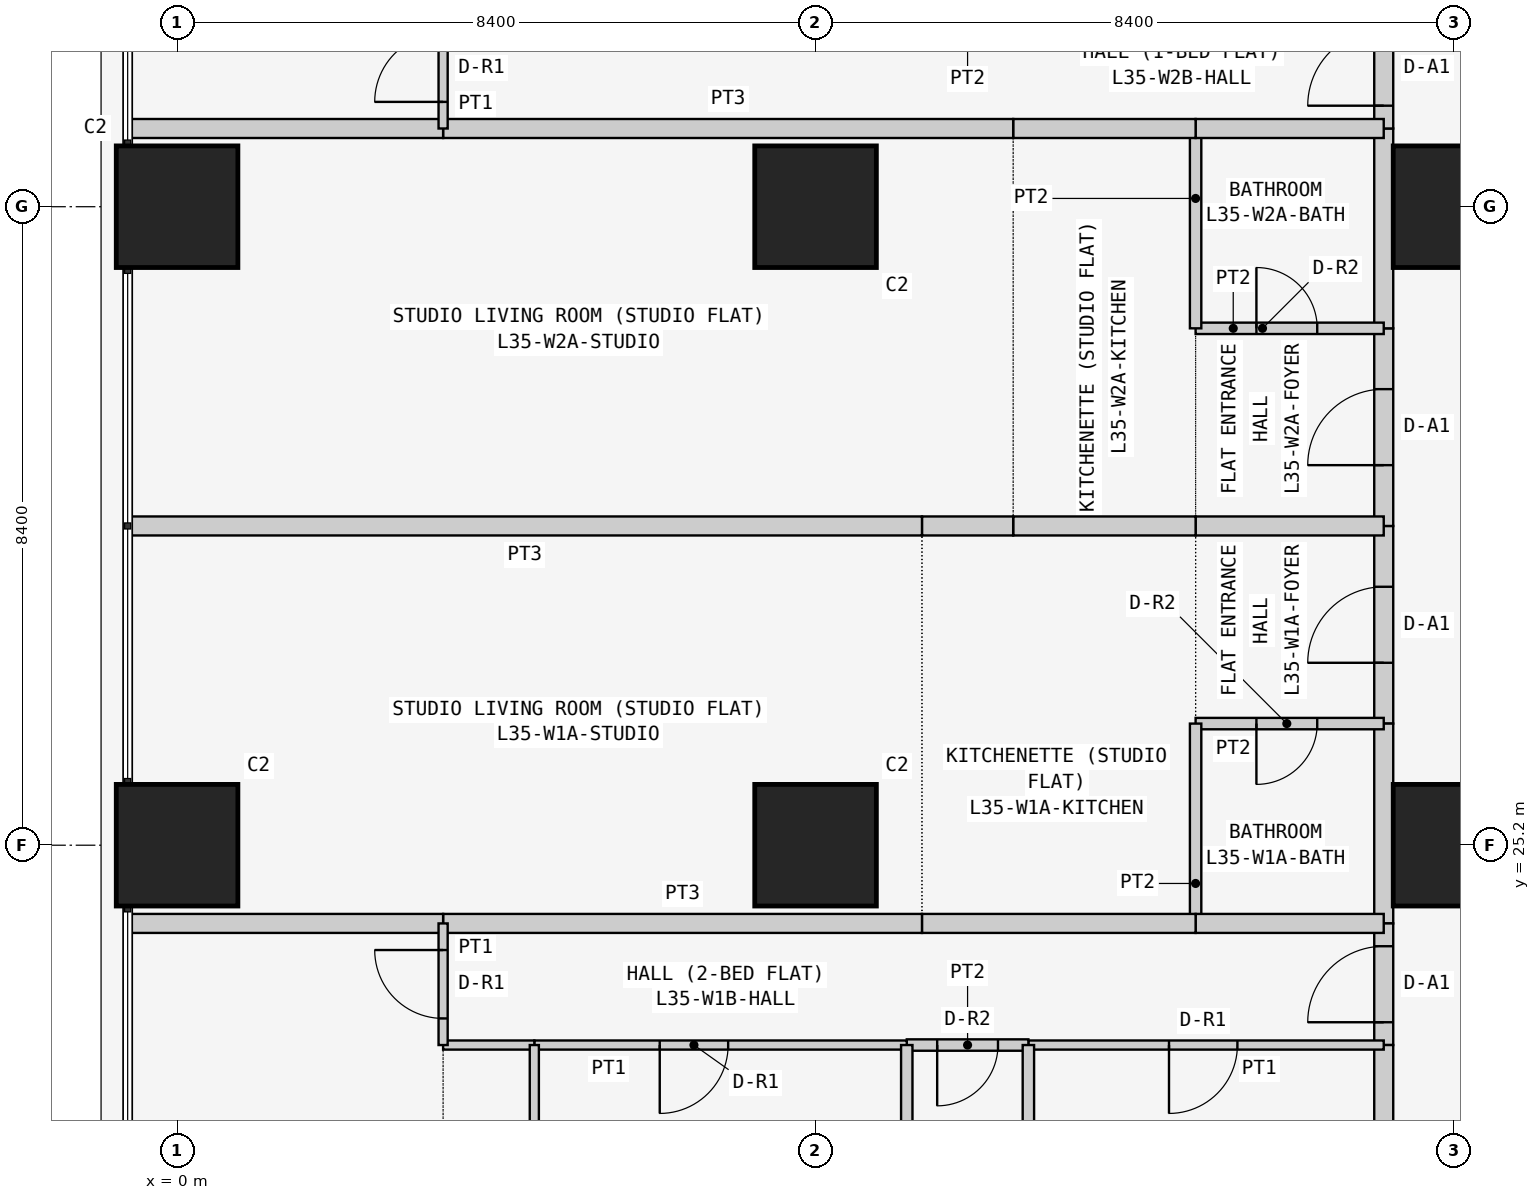
"""IFC4 building model, lengths in metres.
Left out: names, types, materials, properties, quantities, classifications, styles, units other than length and angle.
Written with IfcOpenShell. Run it as: python <this file> out.ifc"""

import sys

from ifc_helpers import new_model, si_unit, direction, frame, frame_2d, origin, origin_2d, place, context, subcontext, project, spatial, rectangle, extrude, element, fill, save


model = new_model("IFC4")
c1 = context("Model", 3, precision=1e-05, world=origin(), true_north=direction((0.0, 1.0)))
c2 = subcontext(c1, "Body", "Model", "MODEL_VIEW")
j1 = project(units=[si_unit("LENGTHUNIT", "METRE"), si_unit("PLANEANGLEUNIT", "RADIAN")], contexts=[c1])
p1 = place(None, origin())
s1 = spatial("IfcSite", under=j1, at=p1, CompositionType="ELEMENT")
p2 = place(p1, origin())
s2 = spatial("IfcBuilding", under=s1, at=p2, CompositionType="ELEMENT")
p3 = place(p2, frame((0.0, 0.0, 137.7)))
s3 = spatial("IfcBuildingStorey", under=s2, at=p3, CompositionType="ELEMENT", Elevation=137.7)
for number, where, z_axis, x_axis in (
    (1, (0.0, 25.2, 0.0), (0.0, 0.0, 1.0), (1.0, 0.0, 0.0)),
    (2, (0.0, 33.6, 0.0), (0.0, 0.0, 1.0), (1.0, 0.0, 0.0)),
    (3, (8.4, 25.2, 0.0), (0.0, 0.0, 1.0), (1.0, 0.0, 0.0)),
    (4, (8.4, 33.6, 0.0), (0.0, 0.0, 1.0), (1.0, 0.0, 0.0)),
    (5, (16.8, 25.2, 0.0), (0.0, 0.0, 1.0), (1.0, 0.0, 0.0)),
    (6, (16.8, 33.6, 0.0), (0.0, 0.0, 1.0), (1.0, 0.0, 0.0)),
):
    element("IfcColumn", number, at=place(p3, frame(where, z_axis=z_axis, x_axis=x_axis)), inside=s3, PredefinedType="COLUMN", context=c2, shape_type="SweptSolid", body=[
        extrude(rectangle(XDim=1.6, YDim=1.6, at=origin_2d()), origin(), (0.0, 0.0, 1.0), 3.6),
    ])
p4 = place(p3, frame((15.875, 26.8, 0.0), z_axis=(0.0, 0.0, 1.0), x_axis=(0.0, 1.0, 0.0)))
e7 = element("IfcWall", 7, at=p4, inside=s3, PredefinedType="PARTITIONING", context=c2, shape_type="SweptSolid", body=[
    extrude(rectangle(XDim=2.6, YDim=0.25, at=frame_2d((1.3, 0.0))), origin(), (0.0, 0.0, 1.0), 3.45),
])
p5 = place(p4, frame((0.8, 0.0, 0.0)))
e8 = element("IfcOpeningElement", 8, at=p5, cuts=e7, PredefinedType="OPENING", context=c2, shape_type="SweptSolid", body=[
    extrude(rectangle(XDim=1.0, YDim=2.1, at=frame_2d((0.5, 1.05))), frame((0.0, 0.135, 0.0), z_axis=(0.0, -1.0, 0.0), x_axis=(1.0, 0.0, 0.0)), (0.0, 0.0, 1.0), 0.27),
])
p6 = place(p3, frame((15.875, 24.171, 0.0), z_axis=(0.0, 0.0, 1.0), x_axis=(0.0, 1.0, 0.0)))
e9 = element("IfcWall", 9, at=p6, inside=s3, PredefinedType="PARTITIONING", context=c2, shape_type="SweptSolid", body=[
    extrude(rectangle(XDim=2.629, YDim=0.25, at=frame_2d((1.314, 0.0))), origin(), (0.0, 0.0, 1.0), 3.45),
])
p7 = place(p3, frame((15.875, 22.571, 0.0), z_axis=(0.0, 0.0, 1.0), x_axis=(0.0, 1.0, 0.0)))
e10 = element("IfcWall", 10, at=p7, inside=s3, PredefinedType="PARTITIONING", context=c2, shape_type="SweptSolid", body=[
    extrude(rectangle(XDim=1.6, YDim=0.25, at=frame_2d((0.8, 0.0))), origin(), (0.0, 0.0, 1.0), 3.45),
])
p8 = place(p7, frame((0.3, 0.0, 0.0)))
e11 = element("IfcOpeningElement", 11, at=p8, cuts=e10, PredefinedType="OPENING", context=c2, shape_type="SweptSolid", body=[
    extrude(rectangle(XDim=1.0, YDim=2.1, at=frame_2d((0.5, 1.05))), frame((0.0, 0.135, 0.0), z_axis=(0.0, -1.0, 0.0), x_axis=(1.0, 0.0, 0.0)), (0.0, 0.0, 1.0), 0.27),
])
p9 = place(p3, frame((15.875, 16.1, 0.0), z_axis=(0.0, 0.0, 1.0), x_axis=(0.0, 1.0, 0.0)))
e12 = element("IfcWall", 12, at=p9, inside=s3, PredefinedType="PARTITIONING", context=c2, shape_type="SweptSolid", body=[
    extrude(rectangle(XDim=6.471, YDim=0.25, at=frame_2d((3.235, 0.0))), origin(), (0.0, 0.0, 1.0), 3.45),
])
p10 = place(p3, frame((15.875, 29.4, 0.0), z_axis=(0.0, 0.0, 1.0), x_axis=(0.0, 1.0, 0.0)))
e13 = element("IfcWall", 13, at=p10, inside=s3, PredefinedType="PARTITIONING", context=c2, shape_type="SweptSolid", body=[
    extrude(rectangle(XDim=2.6, YDim=0.25, at=frame_2d((1.3, 0.0))), origin(), (0.0, 0.0, 1.0), 3.45),
])
p11 = place(p10, frame((0.8, 0.0, 0.0)))
e14 = element("IfcOpeningElement", 14, at=p11, cuts=e13, PredefinedType="OPENING", context=c2, shape_type="SweptSolid", body=[
    extrude(rectangle(XDim=1.0, YDim=2.1, at=frame_2d((0.5, 1.05))), frame((0.0, 0.135, 0.0), z_axis=(0.0, -1.0, 0.0), x_axis=(1.0, 0.0, 0.0)), (0.0, 0.0, 1.0), 0.27),
])
p12 = place(p3, frame((15.875, 32.0, 0.0), z_axis=(0.0, 0.0, 1.0), x_axis=(0.0, 1.0, 0.0)))
e15 = element("IfcWall", 15, at=p12, inside=s3, PredefinedType="PARTITIONING", context=c2, shape_type="SweptSolid", body=[
    extrude(rectangle(XDim=2.629, YDim=0.25, at=frame_2d((1.314, 0.0))), origin(), (0.0, 0.0, 1.0), 3.45),
])
p13 = place(p3, frame((15.875, 34.629, 0.0), z_axis=(0.0, 0.0, 1.0), x_axis=(0.0, 1.0, 0.0)))
e16 = element("IfcWall", 16, at=p13, inside=s3, PredefinedType="PARTITIONING", context=c2, shape_type="SweptSolid", body=[
    extrude(rectangle(XDim=1.6, YDim=0.25, at=frame_2d((0.8, 0.0))), origin(), (0.0, 0.0, 1.0), 3.45),
])
p14 = place(p13, frame((0.3, 0.0, 0.0)))
e17 = element("IfcOpeningElement", 17, at=p14, cuts=e16, PredefinedType="OPENING", context=c2, shape_type="SweptSolid", body=[
    extrude(rectangle(XDim=1.0, YDim=2.1, at=frame_2d((0.5, 1.05))), frame((0.0, 0.135, 0.0), z_axis=(0.0, -1.0, 0.0), x_axis=(1.0, 0.0, 0.0)), (0.0, 0.0, 1.0), 0.27),
])
p15 = place(p3, frame((13.4, 26.8, 0.0), z_axis=(0.0, 0.0, 1.0), x_axis=(1.0, 0.0, 0.0)))
e18 = element("IfcWall", 18, at=p15, inside=s3, PredefinedType="PARTITIONING", context=c2, shape_type="SweptSolid", body=[
    extrude(rectangle(XDim=2.475, YDim=0.15, at=frame_2d((1.238, 0.0))), origin(), (0.0, 0.0, 1.0), 3.45),
])
p16 = place(p15, frame((0.8, 0.0, 0.0)))
e19 = element("IfcOpeningElement", 19, at=p16, cuts=e18, PredefinedType="OPENING", context=c2, shape_type="SweptSolid", body=[
    extrude(rectangle(XDim=0.8, YDim=2.1, at=frame_2d((0.4, 1.05))), frame((0.0, 0.085, 0.0), z_axis=(0.0, -1.0, 0.0), x_axis=(1.0, 0.0, 0.0)), (0.0, 0.0, 1.0), 0.17),
])
p17 = place(p3, frame((15.875, 29.4, 0.0), z_axis=(0.0, 0.0, 1.0), x_axis=(-1.0, 0.0, 0.0)))
e20 = element("IfcWall", 20, at=p17, inside=s3, PredefinedType="PARTITIONING", context=c2, shape_type="SweptSolid", body=[
    extrude(rectangle(XDim=2.475, YDim=0.25, at=frame_2d((1.238, 0.0))), origin(), (0.0, 0.0, 1.0), 3.45),
])
p18 = place(p3, frame((13.4, 26.8, 0.0), z_axis=(0.0, 0.0, 1.0), x_axis=(0.0, -1.0, 0.0)))
e21 = element("IfcWall", 21, at=p18, inside=s3, PredefinedType="PARTITIONING", context=c2, shape_type="SweptSolid", body=[
    extrude(rectangle(XDim=2.629, YDim=0.15, at=frame_2d((1.314, 0.0))), origin(), (0.0, 0.0, 1.0), 3.45),
])
p19 = place(p3, frame((13.4, 24.171, 0.0), z_axis=(0.0, 0.0, 1.0), x_axis=(1.0, 0.0, 0.0)))
e22 = element("IfcWall", 22, at=p19, inside=s3, PredefinedType="PARTITIONING", context=c2, shape_type="SweptSolid", body=[
    extrude(rectangle(XDim=2.475, YDim=0.25, at=frame_2d((1.238, 0.0))), origin(), (0.0, 0.0, 1.0), 3.45),
])
p20 = place(p3, frame((9.8, 24.171, 0.0), z_axis=(0.0, 0.0, 1.0), x_axis=(1.0, 0.0, 0.0)))
e23 = element("IfcWall", 23, at=p20, inside=s3, PredefinedType="PARTITIONING", context=c2, shape_type="SweptSolid", body=[
    extrude(rectangle(XDim=3.6, YDim=0.25, at=frame_2d((1.8, 0.0))), origin(), (0.0, 0.0, 1.0), 3.45),
])
p21 = place(p3, frame((13.4, 29.4, 0.0), z_axis=(0.0, 0.0, 1.0), x_axis=(-1.0, 0.0, 0.0)))
e24 = element("IfcWall", 24, at=p21, inside=s3, PredefinedType="PARTITIONING", context=c2, shape_type="SweptSolid", body=[
    extrude(rectangle(XDim=2.4, YDim=0.25, at=frame_2d((1.2, 0.0))), origin(), (0.0, 0.0, 1.0), 3.45),
])
p22 = place(p3, frame((11.0, 29.4, 0.0), z_axis=(0.0, 0.0, 1.0), x_axis=(-1.0, 0.0, 0.0)))
e25 = element("IfcWall", 25, at=p22, inside=s3, PredefinedType="PARTITIONING", context=c2, shape_type="SweptSolid", body=[
    extrude(rectangle(XDim=1.2, YDim=0.25, at=frame_2d((0.6, 0.0))), origin(), (0.0, 0.0, 1.0), 3.45),
])
p23 = place(p3, frame((3.5, 24.171, 0.0), z_axis=(0.0, 0.0, 1.0), x_axis=(1.0, 0.0, 0.0)))
e26 = element("IfcWall", 26, at=p23, inside=s3, PredefinedType="PARTITIONING", context=c2, shape_type="SweptSolid", body=[
    extrude(rectangle(XDim=6.3, YDim=0.25, at=frame_2d((3.15, 0.0))), origin(), (0.0, 0.0, 1.0), 3.45),
])
p24 = place(p3, frame((-0.65, 24.171, 0.0), z_axis=(0.0, 0.0, 1.0), x_axis=(1.0, 0.0, 0.0)))
e27 = element("IfcWall", 27, at=p24, inside=s3, PredefinedType="PARTITIONING", context=c2, shape_type="SweptSolid", body=[
    extrude(rectangle(XDim=4.15, YDim=0.25, at=frame_2d((2.075, 0.0))), origin(), (0.0, 0.0, 1.0), 3.45),
])
p25 = place(p3, frame((9.8, 29.4, 0.0), z_axis=(0.0, 0.0, 1.0), x_axis=(-1.0, 0.0, 0.0)))
e28 = element("IfcWall", 28, at=p25, inside=s3, PredefinedType="PARTITIONING", context=c2, shape_type="SweptSolid", body=[
    extrude(rectangle(XDim=10.45, YDim=0.25, at=frame_2d((5.225, 0.0))), origin(), (0.0, 0.0, 1.0), 3.45),
])
p26 = place(p3, frame((11.2, 22.571, 0.0), z_axis=(0.0, 0.0, 1.0), x_axis=(1.0, 0.0, 0.0)))
e29 = element("IfcWall", 29, at=p26, inside=s3, PredefinedType="PARTITIONING", context=c2, shape_type="SweptSolid", body=[
    extrude(rectangle(XDim=4.675, YDim=0.12, at=frame_2d((2.337, 0.0))), origin(), (0.0, 0.0, 1.0), 3.45),
])
p27 = place(p26, frame((1.85, 0.0, 0.0)))
e30 = element("IfcOpeningElement", 30, at=p27, cuts=e29, PredefinedType="OPENING", context=c2, shape_type="SweptSolid", body=[
    extrude(rectangle(XDim=0.9, YDim=2.1, at=frame_2d((0.45, 1.05))), frame((0.0, 0.07, 0.0), z_axis=(0.0, -1.0, 0.0), x_axis=(1.0, 0.0, 0.0)), (0.0, 0.0, 1.0), 0.14),
])
p28 = place(p3, frame((9.6, 22.571, 0.0), z_axis=(0.0, 0.0, 1.0), x_axis=(1.0, 0.0, 0.0)))
e31 = element("IfcWall", 31, at=p28, inside=s3, PredefinedType="PARTITIONING", context=c2, shape_type="SweptSolid", body=[
    extrude(rectangle(XDim=1.6, YDim=0.15, at=frame_2d((0.8, 0.0))), origin(), (0.0, 0.0, 1.0), 3.45),
])
p29 = place(p28, frame((0.4, 0.0, 0.0)))
e32 = element("IfcOpeningElement", 32, at=p29, cuts=e31, PredefinedType="OPENING", context=c2, shape_type="SweptSolid", body=[
    extrude(rectangle(XDim=0.8, YDim=2.1, at=frame_2d((0.4, 1.05))), frame((0.0, 0.085, 0.0), z_axis=(0.0, -1.0, 0.0), x_axis=(1.0, 0.0, 0.0)), (0.0, 0.0, 1.0), 0.17),
])
p30 = place(p3, frame((4.7, 22.571, 0.0), z_axis=(0.0, 0.0, 1.0), x_axis=(1.0, 0.0, 0.0)))
e33 = element("IfcWall", 33, at=p30, inside=s3, PredefinedType="PARTITIONING", context=c2, shape_type="SweptSolid", body=[
    extrude(rectangle(XDim=4.9, YDim=0.12, at=frame_2d((2.45, 0.0))), origin(), (0.0, 0.0, 1.0), 3.45),
])
p31 = place(p30, frame((1.65, 0.0, 0.0)))
e34 = element("IfcOpeningElement", 34, at=p31, cuts=e33, PredefinedType="OPENING", context=c2, shape_type="SweptSolid", body=[
    extrude(rectangle(XDim=0.9, YDim=2.1, at=frame_2d((0.45, 1.05))), frame((0.0, 0.07, 0.0), z_axis=(0.0, -1.0, 0.0), x_axis=(1.0, 0.0, 0.0)), (0.0, 0.0, 1.0), 0.14),
])
p32 = place(p3, frame((3.5, 22.571, 0.0), z_axis=(0.0, 0.0, 1.0), x_axis=(1.0, 0.0, 0.0)))
e35 = element("IfcWall", 35, at=p32, inside=s3, PredefinedType="PARTITIONING", context=c2, shape_type="SweptSolid", body=[
    extrude(rectangle(XDim=1.2, YDim=0.12, at=frame_2d((0.6, 0.0))), origin(), (0.0, 0.0, 1.0), 3.45),
])
p33 = place(p3, frame((3.5, 24.171, 0.0), z_axis=(0.0, 0.0, 1.0), x_axis=(0.0, -1.0, 0.0)))
e36 = element("IfcWall", 36, at=p33, inside=s3, PredefinedType="PARTITIONING", context=c2, shape_type="SweptSolid", body=[
    extrude(rectangle(XDim=1.6, YDim=0.12, at=frame_2d((0.8, 0.0))), origin(), (0.0, 0.0, 1.0), 3.45),
])
p34 = place(p33, frame((0.35, 0.0, 0.0)))
e37 = element("IfcOpeningElement", 37, at=p34, cuts=e36, PredefinedType="OPENING", context=c2, shape_type="SweptSolid", body=[
    extrude(rectangle(XDim=0.9, YDim=2.1, at=frame_2d((0.45, 1.05))), frame((0.0, 0.07, 0.0), z_axis=(0.0, -1.0, 0.0), x_axis=(1.0, 0.0, 0.0)), (0.0, 0.0, 1.0), 0.14),
])
for number, where, z_axis, x_axis in (
    (38, (11.2, 22.571, 0.0), (0.0, 0.0, 1.0), (0.0, -1.0, 0.0)),
    (39, (9.6, 22.571, 0.0), (0.0, 0.0, 1.0), (0.0, -1.0, 0.0)),
):
    element("IfcWall", number, at=place(p3, frame(where, z_axis=z_axis, x_axis=x_axis)), inside=s3, PredefinedType="PARTITIONING", context=c2, shape_type="SweptSolid", body=[
        extrude(rectangle(XDim=6.471, YDim=0.15, at=frame_2d((3.235, 0.0))), origin(), (0.0, 0.0, 1.0), 3.45),
    ])
p35 = place(p3, frame((4.7, 22.571, 0.0), z_axis=(0.0, 0.0, 1.0), x_axis=(0.0, -1.0, 0.0)))
e40 = element("IfcWall", 40, at=p35, inside=s3, PredefinedType="PARTITIONING", context=c2, shape_type="SweptSolid", body=[
    extrude(rectangle(XDim=6.471, YDim=0.12, at=frame_2d((3.235, 0.0))), origin(), (0.0, 0.0, 1.0), 3.45),
])
p36 = place(p3, frame((13.4, 32.0, 0.0), z_axis=(0.0, 0.0, 1.0), x_axis=(1.0, 0.0, 0.0)))
e41 = element("IfcWall", 41, at=p36, inside=s3, PredefinedType="PARTITIONING", context=c2, shape_type="SweptSolid", body=[
    extrude(rectangle(XDim=2.475, YDim=0.15, at=frame_2d((1.238, 0.0))), origin(), (0.0, 0.0, 1.0), 3.45),
])
p37 = place(p36, frame((0.8, 0.0, 0.0)))
e42 = element("IfcOpeningElement", 42, at=p37, cuts=e41, PredefinedType="OPENING", context=c2, shape_type="SweptSolid", body=[
    extrude(rectangle(XDim=0.8, YDim=2.1, at=frame_2d((0.4, 1.05))), frame((0.0, 0.085, 0.0), z_axis=(0.0, -1.0, 0.0), x_axis=(1.0, 0.0, 0.0)), (0.0, 0.0, 1.0), 0.17),
])
p38 = place(p3, frame((13.4, 32.0, 0.0), z_axis=(0.0, 0.0, 1.0), x_axis=(0.0, 1.0, 0.0)))
e43 = element("IfcWall", 43, at=p38, inside=s3, PredefinedType="PARTITIONING", context=c2, shape_type="SweptSolid", body=[
    extrude(rectangle(XDim=2.629, YDim=0.15, at=frame_2d((1.314, 0.0))), origin(), (0.0, 0.0, 1.0), 3.45),
])
p39 = place(p3, frame((13.4, 34.629, 0.0), z_axis=(0.0, 0.0, 1.0), x_axis=(1.0, 0.0, 0.0)))
e44 = element("IfcWall", 44, at=p39, inside=s3, PredefinedType="PARTITIONING", context=c2, shape_type="SweptSolid", body=[
    extrude(rectangle(XDim=2.475, YDim=0.25, at=frame_2d((1.238, 0.0))), origin(), (0.0, 0.0, 1.0), 3.45),
])
p40 = place(p3, frame((11.0, 34.629, 0.0), z_axis=(0.0, 0.0, 1.0), x_axis=(1.0, 0.0, 0.0)))
e45 = element("IfcWall", 45, at=p40, inside=s3, PredefinedType="PARTITIONING", context=c2, shape_type="SweptSolid", body=[
    extrude(rectangle(XDim=2.4, YDim=0.25, at=frame_2d((1.2, 0.0))), origin(), (0.0, 0.0, 1.0), 3.45),
])
p41 = place(p3, frame((3.5, 34.629, 0.0), z_axis=(0.0, 0.0, 1.0), x_axis=(1.0, 0.0, 0.0)))
e46 = element("IfcWall", 46, at=p41, inside=s3, PredefinedType="PARTITIONING", context=c2, shape_type="SweptSolid", body=[
    extrude(rectangle(XDim=7.5, YDim=0.25, at=frame_2d((3.75, 0.0))), origin(), (0.0, 0.0, 1.0), 3.45),
])
p42 = place(p3, frame((-0.65, 34.629, 0.0), z_axis=(0.0, 0.0, 1.0), x_axis=(1.0, 0.0, 0.0)))
e47 = element("IfcWall", 47, at=p42, inside=s3, PredefinedType="PARTITIONING", context=c2, shape_type="SweptSolid", body=[
    extrude(rectangle(XDim=4.15, YDim=0.25, at=frame_2d((2.075, 0.0))), origin(), (0.0, 0.0, 1.0), 3.45),
])
p43 = place(p3, frame((3.5, 34.629, 0.0), z_axis=(0.0, 0.0, 1.0), x_axis=(0.0, 1.0, 0.0)))
e48 = element("IfcWall", 48, at=p43, inside=s3, PredefinedType="PARTITIONING", context=c2, shape_type="SweptSolid", body=[
    extrude(rectangle(XDim=1.6, YDim=0.12, at=frame_2d((0.8, 0.0))), origin(), (0.0, 0.0, 1.0), 3.45),
])
p44 = place(p43, frame((0.35, 0.0, 0.0)))
e49 = element("IfcOpeningElement", 49, at=p44, cuts=e48, PredefinedType="OPENING", context=c2, shape_type="SweptSolid", body=[
    extrude(rectangle(XDim=0.9, YDim=2.1, at=frame_2d((0.45, 1.05))), frame((0.0, 0.07, 0.0), z_axis=(0.0, -1.0, 0.0), x_axis=(1.0, 0.0, 0.0)), (0.0, 0.0, 1.0), 0.14),
])
p45 = place(p5, origin())
e50 = element("IfcDoor", 50, at=p45, inside=s3, OperationType="SINGLE_SWING_LEFT", PredefinedType="DOOR", context=c2, shape_type="SweptSolid", body=[
    extrude(rectangle(XDim=1.0, YDim=2.1, at=frame_2d((0.5, 1.05))), frame((0.0, 0.025, 0.0), z_axis=(0.0, -1.0, 0.0), x_axis=(1.0, 0.0, 0.0)), (0.0, 0.0, 1.0), 0.05),
])
fill(e8, e50)
p46 = place(p16, frame((0.8, 0.0, 0.0), z_axis=(0.0, 0.0, 1.0), x_axis=(-1.0, 0.0, 0.0)))
e51 = element("IfcDoor", 51, at=p46, inside=s3, OperationType="SINGLE_SWING_RIGHT", PredefinedType="DOOR", context=c2, shape_type="SweptSolid", body=[
    extrude(rectangle(XDim=0.8, YDim=2.1, at=frame_2d((0.4, 1.05))), frame((0.0, 0.025, 0.0), z_axis=(0.0, -1.0, 0.0), x_axis=(1.0, 0.0, 0.0)), (0.0, 0.0, 1.0), 0.05),
])
fill(e19, e51)
p47 = place(p8, origin())
e52 = element("IfcDoor", 52, at=p47, inside=s3, OperationType="SINGLE_SWING_LEFT", PredefinedType="DOOR", context=c2, shape_type="SweptSolid", body=[
    extrude(rectangle(XDim=1.0, YDim=2.1, at=frame_2d((0.5, 1.05))), frame((0.0, 0.025, 0.0), z_axis=(0.0, -1.0, 0.0), x_axis=(1.0, 0.0, 0.0)), (0.0, 0.0, 1.0), 0.05),
])
fill(e11, e52)
p48 = place(p27, frame((0.9, 0.0, 0.0), z_axis=(0.0, 0.0, 1.0), x_axis=(-1.0, 0.0, 0.0)))
e53 = element("IfcDoor", 53, at=p48, inside=s3, OperationType="SINGLE_SWING_RIGHT", PredefinedType="DOOR", context=c2, shape_type="SweptSolid", body=[
    extrude(rectangle(XDim=0.9, YDim=2.1, at=frame_2d((0.45, 1.05))), frame((0.0, 0.025, 0.0), z_axis=(0.0, -1.0, 0.0), x_axis=(1.0, 0.0, 0.0)), (0.0, 0.0, 1.0), 0.05),
])
fill(e30, e53)
p49 = place(p29, frame((0.8, 0.0, 0.0), z_axis=(0.0, 0.0, 1.0), x_axis=(-1.0, 0.0, 0.0)))
e54 = element("IfcDoor", 54, at=p49, inside=s3, OperationType="SINGLE_SWING_RIGHT", PredefinedType="DOOR", context=c2, shape_type="SweptSolid", body=[
    extrude(rectangle(XDim=0.8, YDim=2.1, at=frame_2d((0.4, 1.05))), frame((0.0, 0.025, 0.0), z_axis=(0.0, -1.0, 0.0), x_axis=(1.0, 0.0, 0.0)), (0.0, 0.0, 1.0), 0.05),
])
fill(e32, e54)
p50 = place(p31, frame((0.9, 0.0, 0.0), z_axis=(0.0, 0.0, 1.0), x_axis=(-1.0, 0.0, 0.0)))
e55 = element("IfcDoor", 55, at=p50, inside=s3, OperationType="SINGLE_SWING_RIGHT", PredefinedType="DOOR", context=c2, shape_type="SweptSolid", body=[
    extrude(rectangle(XDim=0.9, YDim=2.1, at=frame_2d((0.45, 1.05))), frame((0.0, 0.025, 0.0), z_axis=(0.0, -1.0, 0.0), x_axis=(1.0, 0.0, 0.0)), (0.0, 0.0, 1.0), 0.05),
])
fill(e34, e55)
p51 = place(p34, frame((0.9, 0.0, 0.0), z_axis=(0.0, 0.0, 1.0), x_axis=(-1.0, 0.0, 0.0)))
e56 = element("IfcDoor", 56, at=p51, inside=s3, OperationType="SINGLE_SWING_RIGHT", PredefinedType="DOOR", context=c2, shape_type="SweptSolid", body=[
    extrude(rectangle(XDim=0.9, YDim=2.1, at=frame_2d((0.45, 1.05))), frame((0.0, 0.025, 0.0), z_axis=(0.0, -1.0, 0.0), x_axis=(1.0, 0.0, 0.0)), (0.0, 0.0, 1.0), 0.05),
])
fill(e37, e56)
p52 = place(p11, origin())
e57 = element("IfcDoor", 57, at=p52, inside=s3, OperationType="SINGLE_SWING_LEFT", PredefinedType="DOOR", context=c2, shape_type="SweptSolid", body=[
    extrude(rectangle(XDim=1.0, YDim=2.1, at=frame_2d((0.5, 1.05))), frame((0.0, 0.025, 0.0), z_axis=(0.0, -1.0, 0.0), x_axis=(1.0, 0.0, 0.0)), (0.0, 0.0, 1.0), 0.05),
])
fill(e14, e57)
p53 = place(p37, origin())
e58 = element("IfcDoor", 58, at=p53, inside=s3, OperationType="SINGLE_SWING_LEFT", PredefinedType="DOOR", context=c2, shape_type="SweptSolid", body=[
    extrude(rectangle(XDim=0.8, YDim=2.1, at=frame_2d((0.4, 1.05))), frame((0.0, 0.025, 0.0), z_axis=(0.0, -1.0, 0.0), x_axis=(1.0, 0.0, 0.0)), (0.0, 0.0, 1.0), 0.05),
])
fill(e42, e58)
p54 = place(p14, origin())
e59 = element("IfcDoor", 59, at=p54, inside=s3, OperationType="SINGLE_SWING_LEFT", PredefinedType="DOOR", context=c2, shape_type="SweptSolid", body=[
    extrude(rectangle(XDim=1.0, YDim=2.1, at=frame_2d((0.5, 1.05))), frame((0.0, 0.025, 0.0), z_axis=(0.0, -1.0, 0.0), x_axis=(1.0, 0.0, 0.0)), (0.0, 0.0, 1.0), 0.05),
])
fill(e17, e59)
p55 = place(p44, origin())
e60 = element("IfcDoor", 60, at=p55, inside=s3, OperationType="SINGLE_SWING_LEFT", PredefinedType="DOOR", context=c2, shape_type="SweptSolid", body=[
    extrude(rectangle(XDim=0.9, YDim=2.1, at=frame_2d((0.45, 1.05))), frame((0.0, 0.025, 0.0), z_axis=(0.0, -1.0, 0.0), x_axis=(1.0, 0.0, 0.0)), (0.0, 0.0, 1.0), 0.05),
])
fill(e49, e60)
save(model, sys.argv[1])
